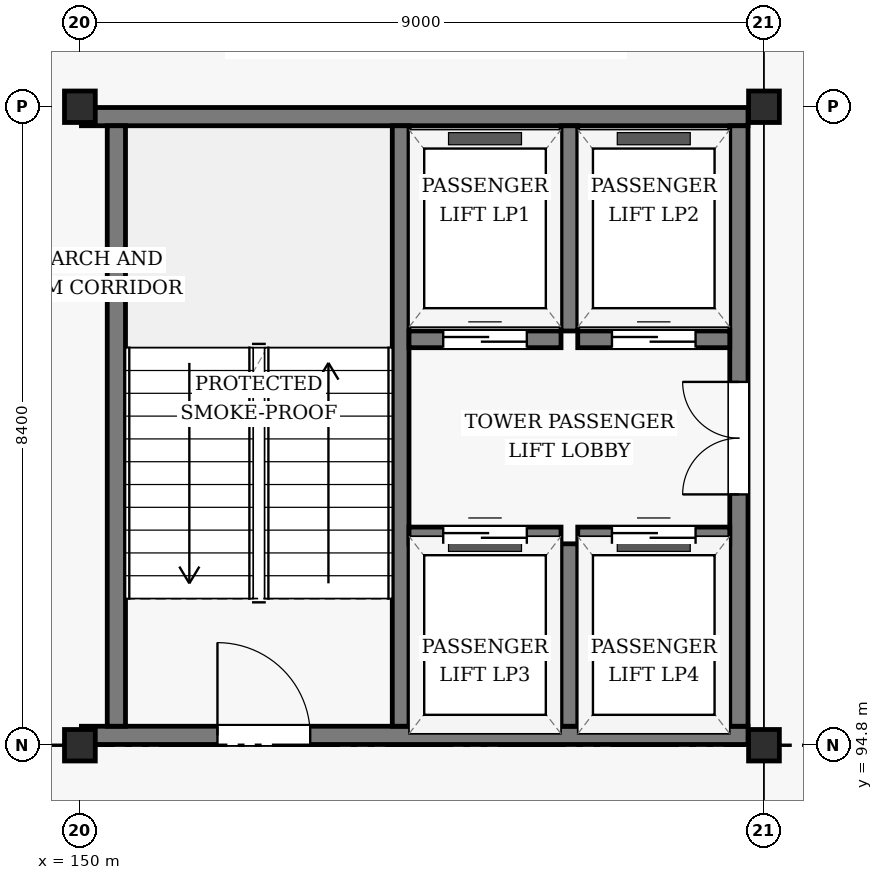
"""IFC4 building model, lengths in metres.
Left out: names, types, materials, properties, quantities, classifications, styles, units other than length and angle.
Written with IfcOpenShell. Run it as: python <this file> out.ifc"""

import sys

from ifc_helpers import new_model, si_unit, direction, frame, frame_2d, origin, origin_2d, place, context, subcontext, project, spatial, rectangle, i_section, extrude, element, fill, save


model = new_model("IFC4")
c1 = context("Model", 3, precision=1e-05, world=origin(), true_north=direction((0.0, 1.0)))
c2 = subcontext(c1, "Body", "Model", "MODEL_VIEW")
j1 = project(units=[si_unit("LENGTHUNIT", "METRE"), si_unit("PLANEANGLEUNIT", "RADIAN")], contexts=[c1])
p1 = place(None, origin())
s1 = spatial("IfcSite", under=j1, at=p1, CompositionType="ELEMENT")
p2 = place(p1, origin())
s2 = spatial("IfcBuilding", under=s1, at=p2, CompositionType="ELEMENT")
p3 = place(p2, frame((0.0, 0.0, 21.0)))
s3 = spatial("IfcBuildingStorey", under=s2, at=p3, CompositionType="ELEMENT", Elevation=21.0)
for number, where, z_axis, x_axis in (
    (1, (150.0, 94.8, 0.0), (0.0, 0.0, 1.0), (1.0, 0.0, 0.0)),
    (2, (150.0, 103.2, 0.0), (0.0, 0.0, 1.0), (1.0, 0.0, 0.0)),
    (3, (159.0, 94.8, 0.0), (0.0, 0.0, 1.0), (1.0, 0.0, 0.0)),
    (4, (159.0, 103.2, 0.0), (0.0, 0.0, 1.0), (1.0, 0.0, 0.0)),
):
    element("IfcColumn", number, at=place(p3, frame(where, z_axis=z_axis, x_axis=x_axis)), inside=s3, PredefinedType="COLUMN", context=c2, shape_type="SweptSolid", body=[
        extrude(i_section(OverallWidth=0.405, OverallDepth=0.414, WebThickness=0.018, FlangeThickness=0.028, FilletRadius=0.022, at=origin_2d()), origin(), (0.0, 0.0, 1.0), 3.6),
    ])
p4 = place(p3, frame((150.02, 94.93, 0.0), z_axis=(0.0, 0.0, 1.0), x_axis=(1.0, 0.0, 0.0)))
e5 = element("IfcWall", 5, at=p4, inside=s3, PredefinedType="SHEAR", context=c2, shape_type="SweptSolid", body=[
    extrude(rectangle(XDim=8.77, YDim=0.24, at=frame_2d((4.385, 0.0))), origin(), (0.0, 0.0, 1.0), 3.35),
])
p5 = place(p4, frame((1.79, 0.0, 0.0)))
e6 = element("IfcOpeningElement", 6, at=p5, cuts=e5, PredefinedType="OPENING", context=c2, shape_type="SweptSolid", body=[
    extrude(rectangle(XDim=1.22, YDim=2.18, at=frame_2d((0.61, 1.09))), frame((0.0, 0.13, 0.0), z_axis=(0.0, -1.0, 0.0), x_axis=(1.0, 0.0, 0.0)), (0.0, 0.0, 1.0), 0.26),
])
p6 = place(p3, frame((150.02, 103.07, 0.0), z_axis=(0.0, 0.0, 1.0), x_axis=(1.0, 0.0, 0.0)))
e7 = element("IfcWall", 7, at=p6, inside=s3, PredefinedType="SHEAR", context=c2, shape_type="SweptSolid", body=[
    extrude(rectangle(XDim=8.77, YDim=0.24, at=frame_2d((4.385, 0.0))), origin(), (0.0, 0.0, 1.0), 3.35),
])
p7 = place(p3, frame((150.48, 95.05, 0.0), z_axis=(0.0, 0.0, 1.0), x_axis=(0.0, 1.0, 0.0)))
e8 = element("IfcWall", 8, at=p7, inside=s3, PredefinedType="SHEAR", context=c2, shape_type="SweptSolid", body=[
    extrude(rectangle(XDim=7.9, YDim=0.24, at=frame_2d((3.95, 0.0))), origin(), (0.0, 0.0, 1.0), 3.35),
])
p8 = place(p3, frame((154.22, 95.05, 0.0), z_axis=(0.0, 0.0, 1.0), x_axis=(0.0, 1.0, 0.0)))
e9 = element("IfcWall", 9, at=p8, inside=s3, PredefinedType="SHEAR", context=c2, shape_type="SweptSolid", body=[
    extrude(rectangle(XDim=7.9, YDim=0.22, at=frame_2d((3.95, 0.0))), origin(), (0.0, 0.0, 1.0), 3.35),
])
p9 = place(p3, frame((158.67, 95.05, 0.0), z_axis=(0.0, 0.0, 1.0), x_axis=(0.0, 1.0, 0.0)))
e10 = element("IfcWall", 10, at=p9, inside=s3, PredefinedType="SHEAR", context=c2, shape_type="SweptSolid", body=[
    extrude(rectangle(XDim=7.9, YDim=0.24, at=frame_2d((3.95, 0.0))), origin(), (0.0, 0.0, 1.0), 3.35),
])
p10 = place(p9, frame((3.05, 0.0, 0.0)))
e11 = element("IfcOpeningElement", 11, at=p10, cuts=e10, PredefinedType="OPENING", context=c2, shape_type="SweptSolid", body=[
    extrude(rectangle(XDim=1.48, YDim=2.22, at=frame_2d((0.74, 1.11))), frame((0.0, 0.13, 0.0), z_axis=(0.0, -1.0, 0.0), x_axis=(1.0, 0.0, 0.0)), (0.0, 0.0, 1.0), 0.26),
])
p11 = place(p3, frame((156.44, 100.25, 0.0), z_axis=(0.0, 0.0, 1.0), x_axis=(0.0, 1.0, 0.0)))
e12 = element("IfcWall", 12, at=p11, inside=s3, PredefinedType="SHEAR", context=c2, shape_type="SweptSolid", body=[
    extrude(rectangle(XDim=2.7, YDim=0.22, at=frame_2d((1.35, 0.0))), origin(), (0.0, 0.0, 1.0), 3.35),
])
p12 = place(p3, frame((154.33, 100.14, 0.0), z_axis=(0.0, 0.0, 1.0), x_axis=(1.0, 0.0, 0.0)))
e13 = element("IfcWall", 13, at=p12, inside=s3, PredefinedType="SHEAR", context=c2, shape_type="SweptSolid", body=[
    extrude(rectangle(XDim=2.0, YDim=0.22, at=frame_2d((1.0, 0.0))), origin(), (0.0, 0.0, 1.0), 3.35),
])
p13 = place(p12, frame((0.45, 0.0, 0.0)))
e14 = element("IfcOpeningElement", 14, at=p13, cuts=e13, PredefinedType="OPENING", context=c2, shape_type="SweptSolid", body=[
    extrude(rectangle(XDim=1.1, YDim=2.15, at=frame_2d((0.55, 1.075))), frame((0.0, 0.12, 0.0), z_axis=(0.0, -1.0, 0.0), x_axis=(1.0, 0.0, 0.0)), (0.0, 0.0, 1.0), 0.24),
])
p14 = place(p3, frame((156.55, 100.14, 0.0), z_axis=(0.0, 0.0, 1.0), x_axis=(1.0, 0.0, 0.0)))
e15 = element("IfcWall", 15, at=p14, inside=s3, PredefinedType="SHEAR", context=c2, shape_type="SweptSolid", body=[
    extrude(rectangle(XDim=2.0, YDim=0.22, at=frame_2d((1.0, 0.0))), origin(), (0.0, 0.0, 1.0), 3.35),
])
p15 = place(p14, frame((0.45, 0.0, 0.0)))
e16 = element("IfcOpeningElement", 16, at=p15, cuts=e15, PredefinedType="OPENING", context=c2, shape_type="SweptSolid", body=[
    extrude(rectangle(XDim=1.1, YDim=2.15, at=frame_2d((0.55, 1.075))), frame((0.0, 0.12, 0.0), z_axis=(0.0, -1.0, 0.0), x_axis=(1.0, 0.0, 0.0)), (0.0, 0.0, 1.0), 0.24),
])
p16 = place(p3, frame((156.44, 95.05, 0.0), z_axis=(0.0, 0.0, 1.0), x_axis=(0.0, 1.0, 0.0)))
e17 = element("IfcWall", 17, at=p16, inside=s3, PredefinedType="SHEAR", context=c2, shape_type="SweptSolid", body=[
    extrude(rectangle(XDim=2.4, YDim=0.22, at=frame_2d((1.2, 0.0))), origin(), (0.0, 0.0, 1.0), 3.35),
])
p17 = place(p3, frame((154.33, 97.56, 0.0), z_axis=(0.0, 0.0, 1.0), x_axis=(1.0, 0.0, 0.0)))
e18 = element("IfcWall", 18, at=p17, inside=s3, PredefinedType="SHEAR", context=c2, shape_type="SweptSolid", body=[
    extrude(rectangle(XDim=2.0, YDim=0.22, at=frame_2d((1.0, 0.0))), origin(), (0.0, 0.0, 1.0), 3.35),
])
p18 = place(p17, frame((0.45, 0.0, 0.0)))
e19 = element("IfcOpeningElement", 19, at=p18, cuts=e18, PredefinedType="OPENING", context=c2, shape_type="SweptSolid", body=[
    extrude(rectangle(XDim=1.1, YDim=2.15, at=frame_2d((0.55, 1.075))), frame((0.0, 0.12, 0.0), z_axis=(0.0, -1.0, 0.0), x_axis=(1.0, 0.0, 0.0)), (0.0, 0.0, 1.0), 0.24),
])
p19 = place(p3, frame((156.55, 97.56, 0.0), z_axis=(0.0, 0.0, 1.0), x_axis=(1.0, 0.0, 0.0)))
e20 = element("IfcWall", 20, at=p19, inside=s3, PredefinedType="SHEAR", context=c2, shape_type="SweptSolid", body=[
    extrude(rectangle(XDim=2.0, YDim=0.22, at=frame_2d((1.0, 0.0))), origin(), (0.0, 0.0, 1.0), 3.35),
])
p20 = place(p19, frame((0.45, 0.0, 0.0)))
e21 = element("IfcOpeningElement", 21, at=p20, cuts=e20, PredefinedType="OPENING", context=c2, shape_type="SweptSolid", body=[
    extrude(rectangle(XDim=1.1, YDim=2.15, at=frame_2d((0.55, 1.075))), frame((0.0, 0.12, 0.0), z_axis=(0.0, -1.0, 0.0), x_axis=(1.0, 0.0, 0.0)), (0.0, 0.0, 1.0), 0.24),
])
p21 = place(p5, origin())
e22 = element("IfcDoor", 22, at=p21, inside=s3, OperationType="SINGLE_SWING_LEFT", PredefinedType="DOOR", context=c2, shape_type="SweptSolid", body=[
    extrude(rectangle(XDim=1.22, YDim=2.18, at=frame_2d((0.61, 1.09))), frame((0.0, 0.025, 0.0), z_axis=(0.0, -1.0, 0.0), x_axis=(1.0, 0.0, 0.0)), (0.0, 0.0, 1.0), 0.05),
])
fill(e6, e22)
p22 = place(p10, origin())
e23 = element("IfcDoor", 23, at=p22, inside=s3, OperationType="DOUBLE_DOOR_SINGLE_SWING", PredefinedType="DOOR", context=c2, shape_type="SweptSolid", body=[
    extrude(rectangle(XDim=1.48, YDim=2.22, at=frame_2d((0.74, 1.11))), frame((0.0, 0.025, 0.0), z_axis=(0.0, -1.0, 0.0), x_axis=(1.0, 0.0, 0.0)), (0.0, 0.0, 1.0), 0.05),
])
fill(e11, e23)
p23 = place(p13, origin())
e24 = element("IfcDoor", 24, at=p23, inside=s3, OperationType="SLIDING_TO_LEFT", PredefinedType="DOOR", context=c2, shape_type="SweptSolid", body=[
    extrude(rectangle(XDim=1.1, YDim=2.15, at=frame_2d((0.55, 1.075))), frame((0.0, 0.025, 0.0), z_axis=(0.0, -1.0, 0.0), x_axis=(1.0, 0.0, 0.0)), (0.0, 0.0, 1.0), 0.05),
])
fill(e14, e24)
p24 = place(p15, origin())
e25 = element("IfcDoor", 25, at=p24, inside=s3, OperationType="SLIDING_TO_LEFT", PredefinedType="DOOR", context=c2, shape_type="SweptSolid", body=[
    extrude(rectangle(XDim=1.1, YDim=2.15, at=frame_2d((0.55, 1.075))), frame((0.0, 0.025, 0.0), z_axis=(0.0, -1.0, 0.0), x_axis=(1.0, 0.0, 0.0)), (0.0, 0.0, 1.0), 0.05),
])
fill(e16, e25)
p25 = place(p18, origin())
e26 = element("IfcDoor", 26, at=p25, inside=s3, OperationType="SLIDING_TO_LEFT", PredefinedType="DOOR", context=c2, shape_type="SweptSolid", body=[
    extrude(rectangle(XDim=1.1, YDim=2.15, at=frame_2d((0.55, 1.075))), frame((0.0, 0.025, 0.0), z_axis=(0.0, -1.0, 0.0), x_axis=(1.0, 0.0, 0.0)), (0.0, 0.0, 1.0), 0.05),
])
fill(e19, e26)
p26 = place(p20, origin())
e27 = element("IfcDoor", 27, at=p26, inside=s3, OperationType="SLIDING_TO_LEFT", PredefinedType="DOOR", context=c2, shape_type="SweptSolid", body=[
    extrude(rectangle(XDim=1.1, YDim=2.15, at=frame_2d((0.55, 1.075))), frame((0.0, 0.025, 0.0), z_axis=(0.0, -1.0, 0.0), x_axis=(1.0, 0.0, 0.0)), (0.0, 0.0, 1.0), 0.05),
])
fill(e21, e27)
save(model, sys.argv[1])
